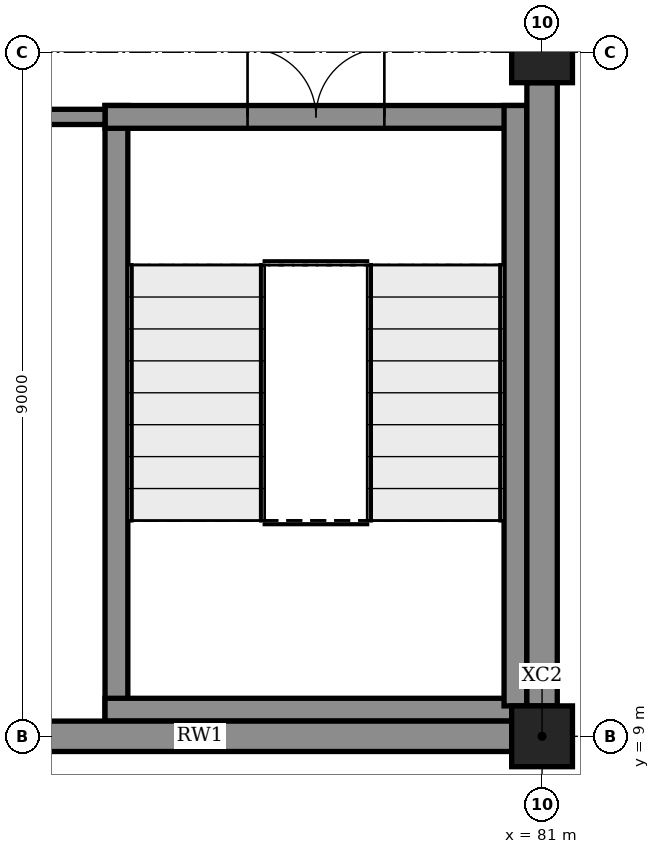
"""IFC4 building model, lengths in metres.
Left out: names, types, materials, properties, quantities, classifications, styles, units other than length and angle.
Written with IfcOpenShell. Run it as: python <this file> out.ifc"""

import sys

from ifc_helpers import new_model, si_unit, direction, frame, frame_2d, origin, origin_2d, place, context, subcontext, project, spatial, rectangle, extrude, element, fill, save


model = new_model("IFC4")
c1 = context("Model", 3, precision=1e-05, world=origin(), true_north=direction((0.0, 1.0)))
c2 = subcontext(c1, "Body", "Model", "MODEL_VIEW")
j1 = project(units=[si_unit("LENGTHUNIT", "METRE"), si_unit("PLANEANGLEUNIT", "RADIAN")], contexts=[c1])
p1 = place(None, origin())
s1 = spatial("IfcSite", under=j1, at=p1, CompositionType="ELEMENT")
p2 = place(p1, origin())
s2 = spatial("IfcBuilding", under=s1, at=p2, CompositionType="ELEMENT")
p3 = place(p2, frame((0.0, 0.0, 6.0)))
s3 = spatial("IfcBuildingStorey", under=s2, at=p3, CompositionType="ELEMENT", Elevation=6.0)
for number, where, z_axis, x_axis in (
    (1, (81.0, 9.0, 0.0), (0.0, 0.0, 1.0), (1.0, 0.0, 0.0)),
    (2, (81.0, 18.0, 0.0), (0.0, 0.0, 1.0), (1.0, 0.0, 0.0)),
):
    element("IfcColumn", number, at=place(p3, frame(where, z_axis=z_axis, x_axis=x_axis)), inside=s3, PredefinedType="COLUMN", context=c2, shape_type="SweptSolid", body=[
        extrude(rectangle(XDim=0.8, YDim=0.8, at=origin_2d()), origin(), (0.0, 0.0, 1.0), 5.5),
    ])
for number, where, z_axis, x_axis in (
    (3, (72.4, 9.0, 0.0), (0.0, 0.0, 1.0), (1.0, 0.0, 0.0)),
    (4, (81.0, 9.4, 0.0), (0.0, 0.0, 1.0), (0.0, 1.0, 0.0)),
):
    element("IfcWall", number, at=place(p3, frame(where, z_axis=z_axis, x_axis=x_axis)), inside=s3, PredefinedType="SOLIDWALL", context=c2, shape_type="SweptSolid", body=[
        extrude(rectangle(XDim=8.2, YDim=0.4, at=frame_2d((4.1, 0.0))), origin(), (0.0, 0.0, 1.0), 4.32),
    ])
p4 = place(p3, frame((80.6, 9.35, 0.0), z_axis=(0.0, 0.0, 1.0), x_axis=(-1.0, 0.0, 0.0)))
e5 = element("IfcWall", 5, at=p4, inside=s3, PredefinedType="SOLIDWALL", context=c2, shape_type="SweptSolid", body=[
    extrude(rectangle(XDim=5.35, YDim=0.3, at=frame_2d((2.675, 0.0))), origin(), (0.0, 0.0, 1.0), 5.22),
])
p5 = place(p3, frame((80.8, 17.15, 0.0), z_axis=(0.0, 0.0, 1.0), x_axis=(-1.0, 0.0, 0.0)))
e6 = element("IfcWall", 6, at=p5, inside=s3, PredefinedType="SOLIDWALL", context=c2, shape_type="SweptSolid", body=[
    extrude(rectangle(XDim=5.55, YDim=0.3, at=frame_2d((2.775, 0.0))), origin(), (0.0, 0.0, 1.0), 5.22),
])
p6 = place(p5, frame((1.875, 0.0, 0.0)))
e7 = element("IfcOpeningElement", 7, at=p6, cuts=e6, PredefinedType="OPENING", context=c2, shape_type="SweptSolid", body=[
    extrude(rectangle(XDim=1.8, YDim=2.4, at=frame_2d((0.9, 1.2))), frame((0.0, 0.16, 0.0), z_axis=(0.0, -1.0, 0.0), x_axis=(1.0, 0.0, 0.0)), (0.0, 0.0, 1.0), 0.32),
])
p7 = place(p3, frame((80.65, 9.4, 0.0), z_axis=(0.0, 0.0, 1.0), x_axis=(0.0, 1.0, 0.0)))
e8 = element("IfcWall", 8, at=p7, inside=s3, PredefinedType="SOLIDWALL", context=c2, shape_type="SweptSolid", body=[
    extrude(rectangle(XDim=7.9, YDim=0.3, at=frame_2d((3.95, 0.0))), origin(), (0.0, 0.0, 1.0), 5.22),
])
p8 = place(p3, frame((75.4, 9.2, 0.0), z_axis=(0.0, 0.0, 1.0), x_axis=(0.0, 1.0, 0.0)))
e9 = element("IfcWall", 9, at=p8, inside=s3, PredefinedType="SOLIDWALL", context=c2, shape_type="SweptSolid", body=[
    extrude(rectangle(XDim=8.1, YDim=0.3, at=frame_2d((4.05, 0.0))), origin(), (0.0, 0.0, 1.0), 5.22),
])
p9 = place(p3, frame((75.25, 17.15, 0.0), z_axis=(0.0, 0.0, 1.0), x_axis=(-1.0, 0.0, 0.0)))
e10 = element("IfcWall", 10, at=p9, inside=s3, PredefinedType="PARTITIONING", context=c2, shape_type="SweptSolid", body=[
    extrude(rectangle(XDim=6.85, YDim=0.2, at=frame_2d((3.425, 0.0))), origin(), (0.0, 0.0, 1.0), 5.22),
])
p10 = place(p9, frame((1.15, 0.0, 0.0)))
e11 = element("IfcOpeningElement", 11, at=p10, cuts=e10, PredefinedType="OPENING", context=c2, shape_type="SweptSolid", body=[
    extrude(rectangle(XDim=0.9, YDim=2.1, at=frame_2d((0.45, 1.05))), frame((0.0, 0.11, 0.0), z_axis=(0.0, -1.0, 0.0), x_axis=(1.0, 0.0, 0.0)), (0.0, 0.0, 1.0), 0.22),
])
p11 = place(p6, frame((1.8, 0.0, 0.0), z_axis=(0.0, 0.0, 1.0), x_axis=(-1.0, 0.0, 0.0)))
e12 = element("IfcDoor", 12, at=p11, inside=s3, OperationType="DOUBLE_DOOR_SINGLE_SWING", PredefinedType="DOOR", context=c2, shape_type="SweptSolid", body=[
    extrude(rectangle(XDim=1.8, YDim=2.4, at=frame_2d((0.9, 1.2))), frame((0.0, 0.025, 0.0), z_axis=(0.0, -1.0, 0.0), x_axis=(1.0, 0.0, 0.0)), (0.0, 0.0, 1.0), 0.05),
])
fill(e7, e12)
save(model, sys.argv[1])
